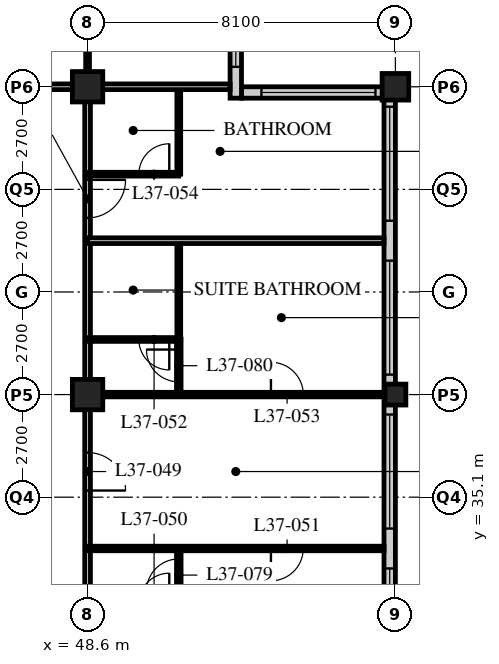
"""IFC4 building model, lengths in metres.
Left out: names, types, materials, properties, quantities, classifications, styles, units other than length and angle.
Written with IfcOpenShell. Run it as: python <this file> out.ifc"""

import sys

from ifc_helpers import new_model, si_unit, direction, frame, frame_2d, origin, origin_2d, place, context, subcontext, project, spatial, rectangle, hollow_rectangle, extrude, element, fill, save


model = new_model("IFC4")
c1 = context("Model", 3, precision=1e-05, world=origin(), true_north=direction((0.0, 1.0)))
c2 = subcontext(c1, "Body", "Model", "MODEL_VIEW")
j1 = project(units=[si_unit("LENGTHUNIT", "METRE"), si_unit("PLANEANGLEUNIT", "RADIAN")], contexts=[c1])
p1 = place(None, origin())
s1 = spatial("IfcSite", under=j1, at=p1, CompositionType="ELEMENT")
p2 = place(p1, origin())
s2 = spatial("IfcBuilding", under=s1, at=p2, CompositionType="ELEMENT")
p3 = place(p2, frame((0.0, 0.0, 144.2)))
s3 = spatial("IfcBuildingStorey", under=s2, at=p3, CompositionType="ELEMENT", Elevation=144.2)
for number, where, z_axis, x_axis in (
    (1, (48.6, 37.8, 0.0), (0.0, 0.0, 1.0), (1.0, 0.0, 0.0)),
    (2, (48.6, 45.9, 0.0), (0.0, 0.0, 1.0), (1.0, 0.0, 0.0)),
):
    element("IfcColumn", number, at=place(p3, frame(where, z_axis=z_axis, x_axis=x_axis)), inside=s3, PredefinedType="COLUMN", context=c2, shape_type="SweptSolid", body=[
        extrude(hollow_rectangle(XDim=0.8, YDim=0.8, WallThickness=0.08, at=origin_2d()), origin(), (0.0, 0.0, 1.0), 3.4),
    ])
p4 = place(p3, frame((56.7, 37.8, 0.0), z_axis=(0.0, 0.0, 1.0), x_axis=(1.0, 0.0, 0.0)))
e3 = element("IfcColumn", 3, at=p4, inside=s3, PredefinedType="COLUMN", context=c2, shape_type="SweptSolid", body=[
    extrude(hollow_rectangle(XDim=0.55, YDim=0.55, WallThickness=0.04, at=origin_2d()), origin(), (0.0, 0.0, 1.0), 3.4),
])
p5 = place(p3, frame((56.7, 45.9, 0.0), z_axis=(0.0, 0.0, 1.0), x_axis=(1.0, 0.0, 0.0)))
e4 = element("IfcColumn", 4, at=p5, inside=s3, PredefinedType="COLUMN", context=c2, shape_type="SweptSolid", body=[
    extrude(hollow_rectangle(XDim=0.7, YDim=0.7, WallThickness=0.07, at=origin_2d()), origin(), (0.0, 0.0, 1.0), 3.4),
])
p6 = place(p3, frame((56.55, 13.8, 0.0), z_axis=(0.0, 0.0, 1.0), x_axis=(0.0, 1.0, 0.0)))
e5 = element("IfcWall", 5, at=p6, inside=s3, PredefinedType="SOLIDWALL", context=c2, shape_type="SweptSolid", body=[
    extrude(rectangle(XDim=32.1, YDim=0.3, at=frame_2d((16.05, 0.0))), origin(), (0.0, 0.0, 1.0), 3.19),
])
p7 = place(p6, frame((0.225, 0.0, 0.9)))
e6 = element("IfcOpeningElement", 6, at=p7, cuts=e5, PredefinedType="OPENING", context=c2, shape_type="SweptSolid", body=[
    extrude(rectangle(XDim=3.0, YDim=1.4, at=frame_2d((1.5, 0.7))), frame((0.0, 0.16, 0.0), z_axis=(0.0, -1.0, 0.0), x_axis=(1.0, 0.0, 0.0)), (0.0, 0.0, 1.0), 0.32),
])
p8 = place(p6, frame((4.275, 0.0, 0.9)))
e7 = element("IfcOpeningElement", 7, at=p8, cuts=e5, PredefinedType="OPENING", context=c2, shape_type="SweptSolid", body=[
    extrude(rectangle(XDim=3.0, YDim=1.4, at=frame_2d((1.5, 0.7))), frame((0.0, 0.16, 0.0), z_axis=(0.0, -1.0, 0.0), x_axis=(1.0, 0.0, 0.0)), (0.0, 0.0, 1.0), 0.32),
])
p9 = place(p6, frame((8.325, 0.0, 0.9)))
e8 = element("IfcOpeningElement", 8, at=p9, cuts=e5, PredefinedType="OPENING", context=c2, shape_type="SweptSolid", body=[
    extrude(rectangle(XDim=3.0, YDim=1.4, at=frame_2d((1.5, 0.7))), frame((0.0, 0.16, 0.0), z_axis=(0.0, -1.0, 0.0), x_axis=(1.0, 0.0, 0.0)), (0.0, 0.0, 1.0), 0.32),
])
p10 = place(p6, frame((12.375, 0.0, 0.9)))
e9 = element("IfcOpeningElement", 9, at=p10, cuts=e5, PredefinedType="OPENING", context=c2, shape_type="SweptSolid", body=[
    extrude(rectangle(XDim=3.0, YDim=1.4, at=frame_2d((1.5, 0.7))), frame((0.0, 0.16, 0.0), z_axis=(0.0, -1.0, 0.0), x_axis=(1.0, 0.0, 0.0)), (0.0, 0.0, 1.0), 0.32),
])
p11 = place(p6, frame((16.425, 0.0, 0.9)))
e10 = element("IfcOpeningElement", 10, at=p11, cuts=e5, PredefinedType="OPENING", context=c2, shape_type="SweptSolid", body=[
    extrude(rectangle(XDim=3.0, YDim=1.4, at=frame_2d((1.5, 0.7))), frame((0.0, 0.16, 0.0), z_axis=(0.0, -1.0, 0.0), x_axis=(1.0, 0.0, 0.0)), (0.0, 0.0, 1.0), 0.32),
])
p12 = place(p6, frame((20.475, 0.0, 0.9)))
e11 = element("IfcOpeningElement", 11, at=p12, cuts=e5, PredefinedType="OPENING", context=c2, shape_type="SweptSolid", body=[
    extrude(rectangle(XDim=3.0, YDim=1.4, at=frame_2d((1.5, 0.7))), frame((0.0, 0.16, 0.0), z_axis=(0.0, -1.0, 0.0), x_axis=(1.0, 0.0, 0.0)), (0.0, 0.0, 1.0), 0.32),
])
p13 = place(p6, frame((24.525, 0.0, 0.9)))
e12 = element("IfcOpeningElement", 12, at=p13, cuts=e5, PredefinedType="OPENING", context=c2, shape_type="SweptSolid", body=[
    extrude(rectangle(XDim=3.0, YDim=1.4, at=frame_2d((1.5, 0.7))), frame((0.0, 0.16, 0.0), z_axis=(0.0, -1.0, 0.0), x_axis=(1.0, 0.0, 0.0)), (0.0, 0.0, 1.0), 0.32),
])
p14 = place(p6, frame((28.575, 0.0, 0.9)))
e13 = element("IfcOpeningElement", 13, at=p14, cuts=e5, PredefinedType="OPENING", context=c2, shape_type="SweptSolid", body=[
    extrude(rectangle(XDim=3.0, YDim=1.4, at=frame_2d((1.5, 0.7))), frame((0.0, 0.16, 0.0), z_axis=(0.0, -1.0, 0.0), x_axis=(1.0, 0.0, 0.0)), (0.0, 0.0, 1.0), 0.32),
])
p15 = place(p3, frame((56.4, 45.75, 0.0), z_axis=(0.0, 0.0, 1.0), x_axis=(-1.0, 0.0, 0.0)))
e14 = element("IfcWall", 14, at=p15, inside=s3, PredefinedType="SOLIDWALL", context=c2, shape_type="SweptSolid", body=[
    extrude(rectangle(XDim=3.75, YDim=0.3, at=frame_2d((1.875, 0.0))), origin(), (0.0, 0.0, 1.0), 3.19),
])
p16 = place(p15, frame((0.225, 0.0, 0.9)))
e15 = element("IfcOpeningElement", 15, at=p16, cuts=e14, PredefinedType="OPENING", context=c2, shape_type="SweptSolid", body=[
    extrude(rectangle(XDim=3.0, YDim=1.4, at=frame_2d((1.5, 0.7))), frame((0.0, 0.16, 0.0), z_axis=(0.0, -1.0, 0.0), x_axis=(1.0, 0.0, 0.0)), (0.0, 0.0, 1.0), 0.32),
])
p17 = place(p3, frame((52.5, 45.6, 0.0), z_axis=(0.0, 0.0, 1.0), x_axis=(0.0, 1.0, 0.0)))
e16 = element("IfcWall", 16, at=p17, inside=s3, PredefinedType="SOLIDWALL", context=c2, shape_type="SweptSolid", body=[
    extrude(rectangle(XDim=4.35, YDim=0.3, at=frame_2d((2.175, 0.0))), origin(), (0.0, 0.0, 1.0), 3.19),
])
p18 = place(p17, frame((0.825, 0.0, 0.9)))
e17 = element("IfcOpeningElement", 17, at=p18, cuts=e16, PredefinedType="OPENING", context=c2, shape_type="SweptSolid", body=[
    extrude(rectangle(XDim=3.0, YDim=1.4, at=frame_2d((1.5, 0.7))), frame((0.0, 0.16, 0.0), z_axis=(0.0, -1.0, 0.0), x_axis=(1.0, 0.0, 0.0)), (0.0, 0.0, 1.0), 0.32),
])
p19 = place(p3, frame((12.15, 45.9, 0.0), z_axis=(0.0, 0.0, 1.0), x_axis=(1.0, 0.0, 0.0)))
e18 = element("IfcWall", 18, at=p19, inside=s3, PredefinedType="PARTITIONING", context=c2, shape_type="SweptSolid", body=[
    extrude(rectangle(XDim=36.45, YDim=0.15, at=frame_2d((18.225, 0.0))), origin(), (0.0, 0.0, 1.0), 2.42),
])
p20 = place(p19, frame((9.225, 0.0, 0.0)))
e19 = element("IfcOpeningElement", 19, at=p20, cuts=e18, PredefinedType="OPENING", context=c2, shape_type="SweptSolid", body=[
    extrude(rectangle(XDim=1.8, YDim=2.4, at=frame_2d((0.9, 1.2))), frame((0.0, 0.085, 0.0), z_axis=(0.0, -1.0, 0.0), x_axis=(1.0, 0.0, 0.0)), (0.0, 0.0, 1.0), 0.17),
])
p21 = place(p19, frame((21.65, 0.0, 0.0)))
e20 = element("IfcOpeningElement", 20, at=p21, cuts=e18, PredefinedType="OPENING", context=c2, shape_type="SweptSolid", body=[
    extrude(rectangle(XDim=1.0, YDim=2.1, at=frame_2d((0.5, 1.05))), frame((0.0, 0.085, 0.0), z_axis=(0.0, -1.0, 0.0), x_axis=(1.0, 0.0, 0.0)), (0.0, 0.0, 1.0), 0.17),
])
p22 = place(p19, frame((24.9, 0.0, 0.0)))
e21 = element("IfcOpeningElement", 21, at=p22, cuts=e18, PredefinedType="OPENING", context=c2, shape_type="SweptSolid", body=[
    extrude(rectangle(XDim=1.0, YDim=2.1, at=frame_2d((0.5, 1.05))), frame((0.0, 0.085, 0.0), z_axis=(0.0, -1.0, 0.0), x_axis=(1.0, 0.0, 0.0)), (0.0, 0.0, 1.0), 0.17),
])
p23 = place(p19, frame((30.8, 0.0, 0.0)))
e22 = element("IfcOpeningElement", 22, at=p23, cuts=e18, PredefinedType="OPENING", context=c2, shape_type="SweptSolid", body=[
    extrude(rectangle(XDim=1.0, YDim=2.1, at=frame_2d((0.5, 1.05))), frame((0.0, 0.085, 0.0), z_axis=(0.0, -1.0, 0.0), x_axis=(1.0, 0.0, 0.0)), (0.0, 0.0, 1.0), 0.17),
])
p24 = place(p19, frame((32.825, 0.0, 0.0)))
e23 = element("IfcOpeningElement", 23, at=p24, cuts=e18, PredefinedType="OPENING", context=c2, shape_type="SweptSolid", body=[
    extrude(rectangle(XDim=1.0, YDim=2.1, at=frame_2d((0.5, 1.05))), frame((0.0, 0.085, 0.0), z_axis=(0.0, -1.0, 0.0), x_axis=(1.0, 0.0, 0.0)), (0.0, 0.0, 1.0), 0.17),
])
p25 = place(p19, frame((1.525, 0.0, 0.0)))
e24 = element("IfcOpeningElement", 24, at=p25, cuts=e18, PredefinedType="OPENING", context=c2, shape_type="SweptSolid", body=[
    extrude(rectangle(XDim=1.0, YDim=2.1, at=frame_2d((0.5, 1.05))), frame((0.0, 0.085, 0.0), z_axis=(0.0, -1.0, 0.0), x_axis=(1.0, 0.0, 0.0)), (0.0, 0.0, 1.0), 0.17),
])
p26 = place(p3, frame((48.6, 21.6, 0.0), z_axis=(0.0, 0.0, 1.0), x_axis=(0.0, 1.0, 0.0)))
e25 = element("IfcWall", 25, at=p26, inside=s3, PredefinedType="PARTITIONING", context=c2, shape_type="SweptSolid", body=[
    extrude(rectangle(XDim=24.3, YDim=0.15, at=frame_2d((12.15, 0.0))), origin(), (0.0, 0.0, 1.0), 2.42),
])
p27 = place(p26, frame((2.75, 0.0, 0.0)))
e26 = element("IfcOpeningElement", 26, at=p27, cuts=e25, PredefinedType="OPENING", context=c2, shape_type="SweptSolid", body=[
    extrude(rectangle(XDim=1.0, YDim=2.1, at=frame_2d((0.5, 1.05))), frame((0.0, 0.085, 0.0), z_axis=(0.0, -1.0, 0.0), x_axis=(1.0, 0.0, 0.0)), (0.0, 0.0, 1.0), 0.17),
])
p28 = place(p26, frame((4.65, 0.0, 0.0)))
e27 = element("IfcOpeningElement", 27, at=p28, cuts=e25, PredefinedType="OPENING", context=c2, shape_type="SweptSolid", body=[
    extrude(rectangle(XDim=1.0, YDim=2.1, at=frame_2d((0.5, 1.05))), frame((0.0, 0.085, 0.0), z_axis=(0.0, -1.0, 0.0), x_axis=(1.0, 0.0, 0.0)), (0.0, 0.0, 1.0), 0.17),
])
p29 = place(p26, frame((13.675, 0.0, 0.0)))
e28 = element("IfcOpeningElement", 28, at=p29, cuts=e25, PredefinedType="OPENING", context=c2, shape_type="SweptSolid", body=[
    extrude(rectangle(XDim=1.0, YDim=2.1, at=frame_2d((0.5, 1.05))), frame((0.0, 0.085, 0.0), z_axis=(0.0, -1.0, 0.0), x_axis=(1.0, 0.0, 0.0)), (0.0, 0.0, 1.0), 0.17),
])
p30 = place(p26, frame((20.85, 0.0, 0.0)))
e29 = element("IfcOpeningElement", 29, at=p30, cuts=e25, PredefinedType="OPENING", context=c2, shape_type="SweptSolid", body=[
    extrude(rectangle(XDim=1.0, YDim=2.1, at=frame_2d((0.5, 1.05))), frame((0.0, 0.085, 0.0), z_axis=(0.0, -1.0, 0.0), x_axis=(1.0, 0.0, 0.0)), (0.0, 0.0, 1.0), 0.17),
])
p31 = place(p3, frame((48.6, 33.75, 0.0), z_axis=(0.0, 0.0, 1.0), x_axis=(1.0, 0.0, 0.0)))
e30 = element("IfcWall", 30, at=p31, inside=s3, PredefinedType="PARTITIONING", context=c2, shape_type="SweptSolid", body=[
    extrude(rectangle(XDim=7.8, YDim=0.12, at=frame_2d((3.9, 0.0))), origin(), (0.0, 0.0, 1.0), 3.19),
])
p32 = place(p31, frame((4.825, 0.0, 0.0)))
e31 = element("IfcOpeningElement", 31, at=p32, cuts=e30, PredefinedType="OPENING", context=c2, shape_type="SweptSolid", body=[
    extrude(rectangle(XDim=0.85, YDim=2.1, at=frame_2d((0.425, 1.05))), frame((0.0, 0.07, 0.0), z_axis=(0.0, -1.0, 0.0), x_axis=(1.0, 0.0, 0.0)), (0.0, 0.0, 1.0), 0.14),
])
p33 = place(p3, frame((51.0, 39.25, 0.0), z_axis=(0.0, 0.0, 1.0), x_axis=(0.0, 1.0, 0.0)))
e32 = element("IfcWall", 32, at=p33, inside=s3, PredefinedType="PARTITIONING", context=c2, shape_type="SweptSolid", body=[
    extrude(rectangle(XDim=2.6, YDim=0.1, at=frame_2d((1.3, 0.0))), origin(), (0.0, 0.0, 1.0), 3.19),
])
p34 = place(p3, frame((48.6, 39.25, 0.0), z_axis=(0.0, 0.0, 1.0), x_axis=(1.0, 0.0, 0.0)))
e33 = element("IfcWall", 33, at=p34, inside=s3, PredefinedType="PARTITIONING", context=c2, shape_type="SweptSolid", body=[
    extrude(rectangle(XDim=2.4, YDim=0.1, at=frame_2d((1.2, 0.0))), origin(), (0.0, 0.0, 1.0), 3.19),
])
p35 = place(p34, frame((1.35, 0.0, 0.0)))
e34 = element("IfcOpeningElement", 34, at=p35, cuts=e33, PredefinedType="OPENING", context=c2, shape_type="SweptSolid", body=[
    extrude(rectangle(XDim=0.8, YDim=2.1, at=frame_2d((0.4, 1.05))), frame((0.0, 0.06, 0.0), z_axis=(0.0, -1.0, 0.0), x_axis=(1.0, 0.0, 0.0)), (0.0, 0.0, 1.0), 0.12),
])
p36 = place(p3, frame((48.6, 37.8, 0.0), z_axis=(0.0, 0.0, 1.0), x_axis=(1.0, 0.0, 0.0)))
e35 = element("IfcWall", 35, at=p36, inside=s3, PredefinedType="PARTITIONING", context=c2, shape_type="SweptSolid", body=[
    extrude(rectangle(XDim=7.8, YDim=0.12, at=frame_2d((3.9, 0.0))), origin(), (0.0, 0.0, 1.0), 2.42),
])
p37 = place(p36, frame((4.825, 0.0, 0.0)))
e36 = element("IfcOpeningElement", 36, at=p37, cuts=e35, PredefinedType="OPENING", context=c2, shape_type="SweptSolid", body=[
    extrude(rectangle(XDim=0.85, YDim=2.1, at=frame_2d((0.425, 1.05))), frame((0.0, 0.07, 0.0), z_axis=(0.0, -1.0, 0.0), x_axis=(1.0, 0.0, 0.0)), (0.0, 0.0, 1.0), 0.14),
])
p38 = place(p3, frame((48.6, 41.85, 0.0), z_axis=(0.0, 0.0, 1.0), x_axis=(1.0, 0.0, 0.0)))
e37 = element("IfcWall", 37, at=p38, inside=s3, PredefinedType="PARTITIONING", context=c2, shape_type="SweptSolid", body=[
    extrude(rectangle(XDim=7.8, YDim=0.15, at=frame_2d((3.9, 0.0))), origin(), (0.0, 0.0, 1.0), 3.19),
])
p39 = place(p3, frame((51.0, 43.6, 0.0), z_axis=(0.0, 0.0, 1.0), x_axis=(0.0, 1.0, 0.0)))
e38 = element("IfcWall", 38, at=p39, inside=s3, PredefinedType="PARTITIONING", context=c2, shape_type="SweptSolid", body=[
    extrude(rectangle(XDim=2.3, YDim=0.1, at=frame_2d((1.15, 0.0))), origin(), (0.0, 0.0, 1.0), 3.19),
])
p40 = place(p3, frame((48.6, 43.6, 0.0), z_axis=(0.0, 0.0, 1.0), x_axis=(1.0, 0.0, 0.0)))
e39 = element("IfcWall", 39, at=p40, inside=s3, PredefinedType="PARTITIONING", context=c2, shape_type="SweptSolid", body=[
    extrude(rectangle(XDim=2.4, YDim=0.1, at=frame_2d((1.2, 0.0))), origin(), (0.0, 0.0, 1.0), 3.19),
])
p41 = place(p40, frame((1.35, 0.0, 0.0)))
e40 = element("IfcOpeningElement", 40, at=p41, cuts=e39, PredefinedType="OPENING", context=c2, shape_type="SweptSolid", body=[
    extrude(rectangle(XDim=0.8, YDim=2.1, at=frame_2d((0.4, 1.05))), frame((0.0, 0.06, 0.0), z_axis=(0.0, -1.0, 0.0), x_axis=(1.0, 0.0, 0.0)), (0.0, 0.0, 1.0), 0.12),
])
p42 = place(p3, frame((48.6, 45.9, 0.0), z_axis=(0.0, 0.0, 1.0), x_axis=(0.0, 1.0, 0.0)))
e41 = element("IfcWall", 41, at=p42, inside=s3, PredefinedType="PARTITIONING", context=c2, shape_type="SweptSolid", body=[
    extrude(rectangle(XDim=2.4, YDim=0.1, at=frame_2d((1.2, 0.0))), origin(), (0.0, 0.0, 1.0), 2.42),
])
p43 = place(p3, frame((48.6, 45.9, 0.0), z_axis=(0.0, 0.0, 1.0), x_axis=(1.0, 0.0, 0.0)))
e42 = element("IfcWall", 42, at=p43, inside=s3, PredefinedType="PARTITIONING", context=c2, shape_type="SweptSolid", body=[
    extrude(rectangle(XDim=3.75, YDim=0.15, at=frame_2d((1.875, 0.0))), origin(), (0.0, 0.0, 1.0), 2.42),
])
p44 = place(p3, frame((51.0, 33.75, 0.0), z_axis=(0.0, 0.0, 1.0), x_axis=(0.0, -1.0, 0.0)))
e43 = element("IfcWall", 43, at=p44, inside=s3, PredefinedType="PARTITIONING", context=c2, shape_type="SweptSolid", body=[
    extrude(rectangle(XDim=1.46, YDim=0.12, at=frame_2d((0.73, 0.0))), origin(), (0.0, 0.0, 1.0), 3.19),
])
p45 = place(p44, frame((0.275, 0.0, 0.0)))
e44 = element("IfcOpeningElement", 44, at=p45, cuts=e43, PredefinedType="OPENING", context=c2, shape_type="SweptSolid", body=[
    extrude(rectangle(XDim=0.85, YDim=2.1, at=frame_2d((0.425, 1.05))), frame((0.0, 0.07, 0.0), z_axis=(0.0, -1.0, 0.0), x_axis=(1.0, 0.0, 0.0)), (0.0, 0.0, 1.0), 0.14),
])
p46 = place(p3, frame((51.0, 39.26, 0.0), z_axis=(0.0, 0.0, 1.0), x_axis=(0.0, -1.0, 0.0)))
e45 = element("IfcWall", 45, at=p46, inside=s3, PredefinedType="PARTITIONING", context=c2, shape_type="SweptSolid", body=[
    extrude(rectangle(XDim=1.46, YDim=0.12, at=frame_2d((0.73, 0.0))), origin(), (0.0, 0.0, 1.0), 3.19),
])
p47 = place(p46, frame((0.275, 0.0, 0.0)))
e46 = element("IfcOpeningElement", 46, at=p47, cuts=e45, PredefinedType="OPENING", context=c2, shape_type="SweptSolid", body=[
    extrude(rectangle(XDim=0.85, YDim=2.1, at=frame_2d((0.425, 1.05))), frame((0.0, 0.07, 0.0), z_axis=(0.0, -1.0, 0.0), x_axis=(1.0, 0.0, 0.0)), (0.0, 0.0, 1.0), 0.14),
])
p48 = place(p11, origin())
e47 = element("IfcWindow", 47, at=p48, inside=s3, PartitioningType="SINGLE_PANEL", PredefinedType="WINDOW", context=c2, shape_type="SweptSolid", body=[
    extrude(rectangle(XDim=3.0, YDim=1.4, at=frame_2d((1.5, 0.7))), frame((0.0, 0.03, 0.0), z_axis=(0.0, -1.0, 0.0), x_axis=(1.0, 0.0, 0.0)), (0.0, 0.0, 1.0), 0.06),
])
fill(e10, e47)
p49 = place(p12, origin())
e48 = element("IfcWindow", 48, at=p49, inside=s3, PartitioningType="SINGLE_PANEL", PredefinedType="WINDOW", context=c2, shape_type="SweptSolid", body=[
    extrude(rectangle(XDim=3.0, YDim=1.4, at=frame_2d((1.5, 0.7))), frame((0.0, 0.03, 0.0), z_axis=(0.0, -1.0, 0.0), x_axis=(1.0, 0.0, 0.0)), (0.0, 0.0, 1.0), 0.06),
])
fill(e11, e48)
p50 = place(p13, origin())
e49 = element("IfcWindow", 49, at=p50, inside=s3, PartitioningType="SINGLE_PANEL", PredefinedType="WINDOW", context=c2, shape_type="SweptSolid", body=[
    extrude(rectangle(XDim=3.0, YDim=1.4, at=frame_2d((1.5, 0.7))), frame((0.0, 0.03, 0.0), z_axis=(0.0, -1.0, 0.0), x_axis=(1.0, 0.0, 0.0)), (0.0, 0.0, 1.0), 0.06),
])
fill(e12, e49)
p51 = place(p14, origin())
e50 = element("IfcWindow", 50, at=p51, inside=s3, PartitioningType="SINGLE_PANEL", PredefinedType="WINDOW", context=c2, shape_type="SweptSolid", body=[
    extrude(rectangle(XDim=3.0, YDim=1.4, at=frame_2d((1.5, 0.7))), frame((0.0, 0.03, 0.0), z_axis=(0.0, -1.0, 0.0), x_axis=(1.0, 0.0, 0.0)), (0.0, 0.0, 1.0), 0.06),
])
fill(e13, e50)
p52 = place(p16, origin())
e51 = element("IfcWindow", 51, at=p52, inside=s3, PartitioningType="SINGLE_PANEL", PredefinedType="WINDOW", context=c2, shape_type="SweptSolid", body=[
    extrude(rectangle(XDim=3.0, YDim=1.4, at=frame_2d((1.5, 0.7))), frame((0.0, 0.03, 0.0), z_axis=(0.0, -1.0, 0.0), x_axis=(1.0, 0.0, 0.0)), (0.0, 0.0, 1.0), 0.06),
])
fill(e15, e51)
p53 = place(p18, origin())
e52 = element("IfcWindow", 52, at=p53, inside=s3, PartitioningType="SINGLE_PANEL", PredefinedType="WINDOW", context=c2, shape_type="SweptSolid", body=[
    extrude(rectangle(XDim=3.0, YDim=1.4, at=frame_2d((1.5, 0.7))), frame((0.0, 0.03, 0.0), z_axis=(0.0, -1.0, 0.0), x_axis=(1.0, 0.0, 0.0)), (0.0, 0.0, 1.0), 0.06),
])
fill(e17, e52)
p54 = place(p29, origin())
e53 = element("IfcDoor", 53, at=p54, inside=s3, OperationType="SINGLE_SWING_RIGHT", PredefinedType="DOOR", context=c2, shape_type="SweptSolid", body=[
    extrude(rectangle(XDim=1.0, YDim=2.1, at=frame_2d((0.5, 1.05))), frame((0.0, 0.025, 0.0), z_axis=(0.0, -1.0, 0.0), x_axis=(1.0, 0.0, 0.0)), (0.0, 0.0, 1.0), 0.05),
])
fill(e28, e53)
p55 = place(p32, origin())
e54 = element("IfcDoor", 54, at=p55, inside=s3, OperationType="SINGLE_SWING_RIGHT", PredefinedType="DOOR", context=c2, shape_type="SweptSolid", body=[
    extrude(rectangle(XDim=0.85, YDim=2.1, at=frame_2d((0.425, 1.05))), frame((0.0, 0.025, 0.0), z_axis=(0.0, -1.0, 0.0), x_axis=(1.0, 0.0, 0.0)), (0.0, 0.0, 1.0), 0.05),
])
fill(e31, e54)
p56 = place(p35, origin())
e55 = element("IfcDoor", 55, at=p56, inside=s3, OperationType="SINGLE_SWING_LEFT", PredefinedType="DOOR", context=c2, shape_type="SweptSolid", body=[
    extrude(rectangle(XDim=0.8, YDim=2.1, at=frame_2d((0.4, 1.05))), frame((0.0, 0.025, 0.0), z_axis=(0.0, -1.0, 0.0), x_axis=(1.0, 0.0, 0.0)), (0.0, 0.0, 1.0), 0.05),
])
fill(e34, e55)
p57 = place(p37, origin())
e56 = element("IfcDoor", 56, at=p57, inside=s3, OperationType="SINGLE_SWING_LEFT", PredefinedType="DOOR", context=c2, shape_type="SweptSolid", body=[
    extrude(rectangle(XDim=0.85, YDim=2.1, at=frame_2d((0.425, 1.05))), frame((0.0, 0.025, 0.0), z_axis=(0.0, -1.0, 0.0), x_axis=(1.0, 0.0, 0.0)), (0.0, 0.0, 1.0), 0.05),
])
fill(e36, e56)
p58 = place(p41, origin())
e57 = element("IfcDoor", 57, at=p58, inside=s3, OperationType="SINGLE_SWING_RIGHT", PredefinedType="DOOR", context=c2, shape_type="SweptSolid", body=[
    extrude(rectangle(XDim=0.8, YDim=2.1, at=frame_2d((0.4, 1.05))), frame((0.0, 0.025, 0.0), z_axis=(0.0, -1.0, 0.0), x_axis=(1.0, 0.0, 0.0)), (0.0, 0.0, 1.0), 0.05),
])
fill(e40, e57)
p59 = place(p30, origin())
e58 = element("IfcDoor", 58, at=p59, inside=s3, OperationType="SINGLE_SWING_LEFT", PredefinedType="DOOR", context=c2, shape_type="SweptSolid", body=[
    extrude(rectangle(XDim=1.0, YDim=2.1, at=frame_2d((0.5, 1.05))), frame((0.0, 0.025, 0.0), z_axis=(0.0, -1.0, 0.0), x_axis=(1.0, 0.0, 0.0)), (0.0, 0.0, 1.0), 0.05),
])
fill(e29, e58)
p60 = place(p45, origin())
e59 = element("IfcDoor", 59, at=p60, inside=s3, OperationType="SINGLE_SWING_LEFT", PredefinedType="DOOR", context=c2, shape_type="SweptSolid", body=[
    extrude(rectangle(XDim=0.85, YDim=2.1, at=frame_2d((0.425, 1.05))), frame((0.0, 0.025, 0.0), z_axis=(0.0, -1.0, 0.0), x_axis=(1.0, 0.0, 0.0)), (0.0, 0.0, 1.0), 0.05),
])
fill(e44, e59)
p61 = place(p47, origin())
e60 = element("IfcDoor", 60, at=p61, inside=s3, OperationType="SINGLE_SWING_RIGHT", PredefinedType="DOOR", context=c2, shape_type="SweptSolid", body=[
    extrude(rectangle(XDim=0.85, YDim=2.1, at=frame_2d((0.425, 1.05))), frame((0.0, 0.025, 0.0), z_axis=(0.0, -1.0, 0.0), x_axis=(1.0, 0.0, 0.0)), (0.0, 0.0, 1.0), 0.05),
])
fill(e46, e60)
save(model, sys.argv[1])
